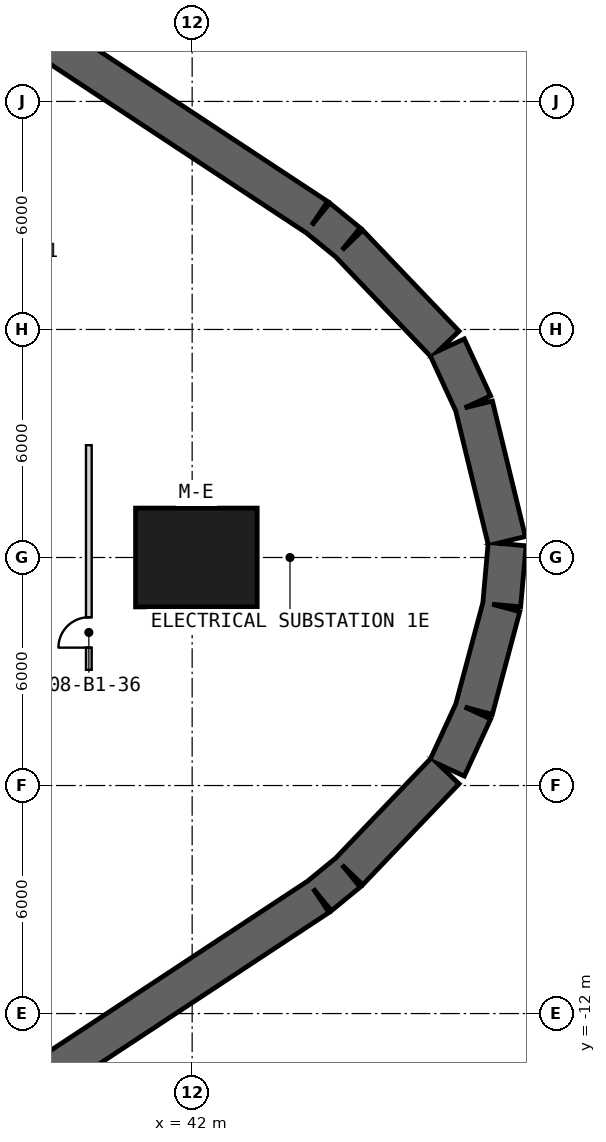
"""IFC4 building model, lengths in metres.
Left out: names, types, materials, properties, quantities, classifications, styles, units other than length and angle.
Written with IfcOpenShell. Run it as: python <this file> out.ifc"""

import sys

from ifc_helpers import new_model, si_unit, direction, frame, frame_2d, origin, origin_2d, place, context, subcontext, project, spatial, rectangle, extrude, element, fill, save


model = new_model("IFC4")
c1 = context("Model", 3, precision=1e-05, world=origin(), true_north=direction((0.0, 1.0)))
c2 = subcontext(c1, "Body", "Model", "MODEL_VIEW")
j1 = project(units=[si_unit("LENGTHUNIT", "METRE"), si_unit("PLANEANGLEUNIT", "RADIAN")], contexts=[c1])
p1 = place(None, origin())
s1 = spatial("IfcSite", under=j1, at=p1, CompositionType="ELEMENT")
p2 = place(p1, origin())
s2 = spatial("IfcBuilding", under=s1, at=p2, CompositionType="ELEMENT")
p3 = place(p2, frame((0.0, 0.0, -5.5)))
s3 = spatial("IfcBuildingStorey", under=s2, at=p3, CompositionType="ELEMENT", Elevation=-5.5)
p4 = place(p3, frame((48.708, 5.543, 0.0), z_axis=(0.0, 0.0, 1.0), x_axis=(0.419020672457, -0.907976693563, 0.0)))
e1 = element("IfcWall", 1, at=p4, inside=s3, PredefinedType="SHEAR", context=c2, shape_type="SweptSolid", body=[
    extrude(rectangle(XDim=1.651, YDim=1.0, at=frame_2d((0.826, 0.0))), origin(), (0.0, 0.0, 1.0), 5.5),
])
p5 = place(p3, frame((49.416, 3.998, 0.0), z_axis=(0.0, 0.0, 1.0), x_axis=(0.236219100911, -0.971699818033, 0.0)))
e2 = element("IfcWall", 2, at=p5, inside=s3, PredefinedType="SHEAR", context=c2, shape_type="SweptSolid", body=[
    extrude(rectangle(XDim=3.668, YDim=1.0, at=frame_2d((1.834, 0.0))), origin(), (0.0, 0.0, 1.0), 5.5),
])
p6 = place(p3, frame((50.289, 0.352, 0.0), z_axis=(0.0, 0.0, 1.0), x_axis=(-0.088459638237, -0.996079762069, 0.0)))
e3 = element("IfcWall", 3, at=p6, inside=s3, PredefinedType="SHEAR", context=c2, shape_type="SweptSolid", body=[
    extrude(rectangle(XDim=1.612, YDim=1.0, at=frame_2d((0.806, 0.0))), origin(), (0.0, 0.0, 1.0), 5.5),
])
p7 = place(p3, frame((50.139, -1.296, 0.0), z_axis=(0.0, 0.0, 1.0), x_axis=(-0.258259551777, -0.966075568429, 0.0)))
e4 = element("IfcWall", 4, at=p7, inside=s3, PredefinedType="SHEAR", context=c2, shape_type="SweptSolid", body=[
    extrude(rectangle(XDim=2.8, YDim=1.0, at=frame_2d((1.4, 0.0))), origin(), (0.0, 0.0, 1.0), 5.5),
])
p8 = place(p3, frame((49.401, -4.041, 0.0), z_axis=(0.0, 0.0, 1.0), x_axis=(-0.419067538135, -0.907955064131, 0.0)))
e5 = element("IfcWall", 5, at=p8, inside=s3, PredefinedType="SHEAR", context=c2, shape_type="SweptSolid", body=[
    extrude(rectangle(XDim=1.654, YDim=1.0, at=frame_2d((0.827, 0.0))), origin(), (0.0, 0.0, 1.0), 5.5),
])
p9 = place(p3, frame((48.662, -5.611, 0.0), z_axis=(0.0, 0.0, 1.0), x_axis=(-0.690456767335, -0.723373660317, 0.0)))
e6 = element("IfcWall", 6, at=p9, inside=s3, PredefinedType="SHEAR", context=c2, shape_type="SweptSolid", body=[
    extrude(rectangle(XDim=3.671, YDim=1.0, at=frame_2d((1.836, 0.0))), origin(), (0.0, 0.0, 1.0), 5.5),
])
p10 = place(p3, frame((46.105, -8.287, 0.0), z_axis=(0.0, 0.0, 1.0), x_axis=(-0.773380097322, -0.633942603922, 0.0)))
e7 = element("IfcWall", 7, at=p10, inside=s3, PredefinedType="SHEAR", context=c2, shape_type="SweptSolid", body=[
    extrude(rectangle(XDim=0.98, YDim=1.0, at=frame_2d((0.49, 0.0))), origin(), (0.0, 0.0, 1.0), 5.5),
])
p11 = place(p3, frame((45.325, -8.924, 0.0), z_axis=(0.0, 0.0, 1.0), x_axis=(-0.834959286921, -0.550311720014, 0.0)))
e8 = element("IfcWall", 8, at=p11, inside=s3, PredefinedType="SHEAR", context=c2, shape_type="SweptSolid", body=[
    extrude(rectangle(XDim=14.134, YDim=1.0, at=frame_2d((7.067, 0.0))), origin(), (0.0, 0.0, 1.0), 5.5),
])
p12 = place(p3, frame((33.525, 16.705, 0.0), z_axis=(0.0, 0.0, 1.0), x_axis=(0.834958566613, -0.550312812898, 0.0)))
e9 = element("IfcWall", 9, at=p12, inside=s3, PredefinedType="SHEAR", context=c2, shape_type="SweptSolid", body=[
    extrude(rectangle(XDim=14.086, YDim=1.0, at=frame_2d((7.043, 0.0))), origin(), (0.0, 0.0, 1.0), 5.5),
])
p13 = place(p3, frame((45.307, 8.938, 0.0), z_axis=(0.0, 0.0, 1.0), x_axis=(0.774938327928, -0.632036856448, 0.0)))
e10 = element("IfcWall", 10, at=p13, inside=s3, PredefinedType="SHEAR", context=c2, shape_type="SweptSolid", body=[
    extrude(rectangle(XDim=1.03, YDim=1.0, at=frame_2d((0.515, 0.0))), origin(), (0.0, 0.0, 1.0), 5.5),
])
p14 = place(p3, frame((46.128, 8.266, 0.0), z_axis=(0.0, 0.0, 1.0), x_axis=(0.690452015731, -0.723378195672, 0.0)))
e11 = element("IfcWall", 11, at=p14, inside=s3, PredefinedType="SHEAR", context=c2, shape_type="SweptSolid", body=[
    extrude(rectangle(XDim=3.67, YDim=1.0, at=frame_2d((1.835, 0.0))), origin(), (0.0, 0.0, 1.0), 5.5),
])
p15 = place(p3, frame((42.111, 0.0, 0.0), z_axis=(0.0, 0.0, 1.0), x_axis=(1.0, 0.0, 0.0)))
e12 = element("IfcColumn", 12, at=p15, inside=s3, PredefinedType="COLUMN", context=c2, shape_type="SweptSolid", body=[
    extrude(rectangle(XDim=3.2, YDim=2.6, at=origin_2d()), origin(), (0.0, 0.0, 1.0), 5.5),
])
p16 = place(p3, frame((39.281, -2.955, 0.0), z_axis=(0.0, 0.0, 1.0), x_axis=(0.0, 1.0, 0.0)))
e13 = element("IfcWall", 13, at=p16, inside=s3, PredefinedType="PLUMBINGWALL", context=c2, shape_type="SweptSolid", body=[
    extrude(rectangle(XDim=5.911, YDim=0.15, at=frame_2d((2.955, 0.0))), origin(), (0.0, 0.0, 1.0), 4.07),
])
p17 = place(p16, frame((0.583, 0.0, 0.0)))
e14 = element("IfcOpeningElement", 14, at=p17, cuts=e13, PredefinedType="OPENING", context=c2, shape_type="SweptSolid", body=[
    extrude(rectangle(XDim=0.8, YDim=2.1, at=frame_2d((0.4, 1.05))), frame((0.0, 0.085, 0.0), z_axis=(0.0, -1.0, 0.0), x_axis=(1.0, 0.0, 0.0)), (0.0, 0.0, 1.0), 0.17),
])
p18 = place(p17, origin())
e15 = element("IfcDoor", 15, at=p18, inside=s3, OperationType="SINGLE_SWING_LEFT", PredefinedType="USERDEFINED", context=c2, shape_type="SweptSolid", body=[
    extrude(rectangle(XDim=0.8, YDim=2.1, at=frame_2d((0.4, 1.05))), frame((0.0, 0.025, 0.0), z_axis=(0.0, -1.0, 0.0), x_axis=(1.0, 0.0, 0.0)), (0.0, 0.0, 1.0), 0.05),
])
fill(e14, e15)
save(model, sys.argv[1])
